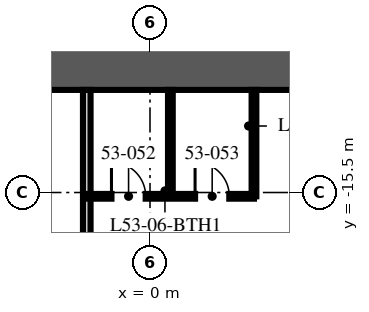
"""IFC4 building model, lengths in metres.
Left out: names, types, materials, properties, quantities, classifications, styles, units other than length and angle.
Written with IfcOpenShell. Run it as: python <this file> out.ifc"""

import sys

from ifc_helpers import new_model, si_unit, direction, frame, frame_2d, origin, place, context, subcontext, project, spatial, rectangle, extrude, element, fill, save


model = new_model("IFC4")
c1 = context("Model", 3, precision=1e-05, world=origin(), true_north=direction((0.0, 1.0)))
c2 = subcontext(c1, "Body", "Model", "MODEL_VIEW")
j1 = project(units=[si_unit("LENGTHUNIT", "METRE"), si_unit("PLANEANGLEUNIT", "RADIAN")], contexts=[c1])
p1 = place(None, origin())
s1 = spatial("IfcSite", under=j1, at=p1, CompositionType="ELEMENT")
p2 = place(p1, origin())
s2 = spatial("IfcBuilding", under=s1, at=p2, CompositionType="ELEMENT")
p3 = place(p2, frame((0.0, 0.0, 214.5)))
s3 = spatial("IfcBuildingStorey", under=s2, at=p3, CompositionType="ELEMENT", Elevation=214.5)
p4 = place(p3, frame((-15.5, -12.0, -0.25), z_axis=(0.0, 0.0, 1.0), x_axis=(1.0, 0.0, 0.0)))
e1 = element("IfcWall", 1, at=p4, inside=s3, PredefinedType="SHEAR", context=c2, shape_type="SweptSolid", body=[
    extrude(rectangle(XDim=31.0, YDim=1.6, at=frame_2d((15.5, 0.0))), origin(), (0.0, 0.0, 1.0), 3.75),
])
p5 = place(p3, frame((-1.664, -12.8, 0.0), z_axis=(0.0, 0.0, 1.0), x_axis=(0.0, -1.0, 0.0)))
e2 = element("IfcWall", 2, at=p5, inside=s3, PredefinedType="PARTITIONING", context=c2, shape_type="SweptSolid", body=[
    extrude(rectangle(XDim=13.4, YDim=0.2, at=frame_2d((6.7, 0.0))), origin(), (0.0, 0.0, 1.0), 2.91),
])
p6 = place(p3, frame((-1.664, -15.6, 0.0), z_axis=(0.0, 0.0, 1.0), x_axis=(1.0, 0.0, 0.0)))
e3 = element("IfcWall", 3, at=p6, inside=s3, PredefinedType="PARTITIONING", context=c2, shape_type="SweptSolid", body=[
    extrude(rectangle(XDim=4.4, YDim=0.125, at=frame_2d((2.2, 0.0))), origin(), (0.0, 0.0, 1.0), 2.6),
])
p7 = place(p6, frame((0.65, 0.0, 0.0)))
e4 = element("IfcOpeningElement", 4, at=p7, cuts=e3, PredefinedType="OPENING", context=c2, shape_type="SweptSolid", body=[
    extrude(rectangle(XDim=0.9, YDim=2.1, at=frame_2d((0.45, 1.05))), frame((0.0, 0.073, 0.0), z_axis=(0.0, -1.0, 0.0), x_axis=(1.0, 0.0, 0.0)), (0.0, 0.0, 1.0), 0.145),
])
p8 = place(p6, frame((2.85, 0.0, 0.0)))
e5 = element("IfcOpeningElement", 5, at=p8, cuts=e3, PredefinedType="OPENING", context=c2, shape_type="SweptSolid", body=[
    extrude(rectangle(XDim=0.9, YDim=2.1, at=frame_2d((0.45, 1.05))), frame((0.0, 0.073, 0.0), z_axis=(0.0, -1.0, 0.0), x_axis=(1.0, 0.0, 0.0)), (0.0, 0.0, 1.0), 0.145),
])
for number, where, z_axis, x_axis in (
    (6, (0.536, -12.8, 0.0), (0.0, 0.0, 1.0), (0.0, -1.0, 0.0)),
    (7, (2.736, -12.8, 0.0), (0.0, 0.0, 1.0), (0.0, -1.0, 0.0)),
):
    element("IfcWall", number, at=place(p3, frame(where, z_axis=z_axis, x_axis=x_axis)), inside=s3, PredefinedType="PARTITIONING", context=c2, shape_type="SweptSolid", body=[
        extrude(rectangle(XDim=2.8, YDim=0.125, at=frame_2d((1.4, 0.0))), origin(), (0.0, 0.0, 1.0), 3.5),
    ])
p9 = place(p7, origin())
e8 = element("IfcDoor", 8, at=p9, inside=s3, OperationType="SINGLE_SWING_LEFT", PredefinedType="DOOR", context=c2, shape_type="SweptSolid", body=[
    extrude(rectangle(XDim=0.9, YDim=2.1, at=frame_2d((0.45, 1.05))), frame((0.0, 0.025, 0.0), z_axis=(0.0, -1.0, 0.0), x_axis=(1.0, 0.0, 0.0)), (0.0, 0.0, 1.0), 0.05),
])
fill(e4, e8)
p10 = place(p8, origin())
e9 = element("IfcDoor", 9, at=p10, inside=s3, OperationType="SINGLE_SWING_LEFT", PredefinedType="DOOR", context=c2, shape_type="SweptSolid", body=[
    extrude(rectangle(XDim=0.9, YDim=2.1, at=frame_2d((0.45, 1.05))), frame((0.0, 0.025, 0.0), z_axis=(0.0, -1.0, 0.0), x_axis=(1.0, 0.0, 0.0)), (0.0, 0.0, 1.0), 0.05),
])
fill(e5, e9)
save(model, sys.argv[1])
